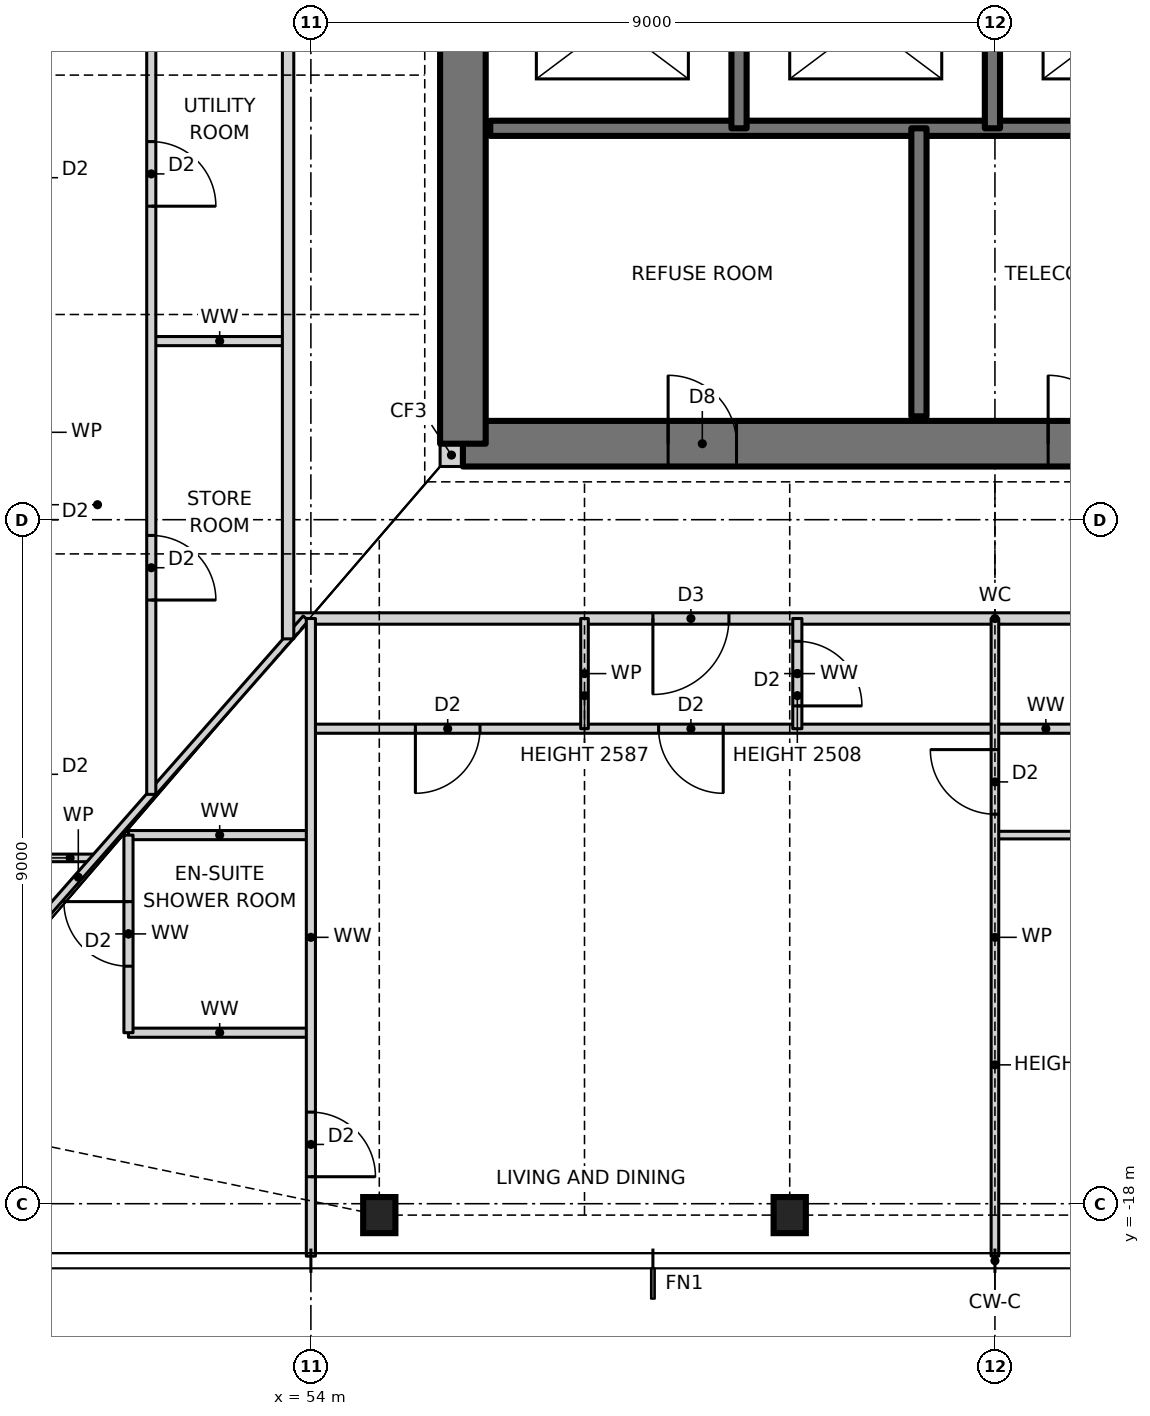
"""IFC4 building model, lengths in metres.
Left out: names, types, materials, properties, quantities, classifications, styles, units other than length and angle.
Written with IfcOpenShell. Run it as: python <this file> out.ifc"""

import sys

from ifc_helpers import new_model, si_unit, direction, frame, frame_2d, origin, origin_2d, place, context, subcontext, project, spatial, rectangle, i_section, extrude, element, fill, save


model = new_model("IFC4")
c1 = context("Model", 3, precision=1e-05, world=origin(), true_north=direction((0.0, 1.0)))
c2 = subcontext(c1, "Body", "Model", "MODEL_VIEW")
j1 = project(units=[si_unit("LENGTHUNIT", "METRE"), si_unit("PLANEANGLEUNIT", "RADIAN")], contexts=[c1])
p1 = place(None, origin())
s1 = spatial("IfcSite", under=j1, at=p1, CompositionType="ELEMENT")
p2 = place(p1, origin())
s2 = spatial("IfcBuilding", under=s1, at=p2, CompositionType="ELEMENT")
p3 = place(p2, frame((0.0, 0.0, 32.5)))
s3 = spatial("IfcBuildingStorey", under=s2, at=p3, CompositionType="ELEMENT", Elevation=32.5)
for number, where, z_axis, x_axis in (
    (1, (54.9, -18.15, 0.0), (0.0, 0.0, 1.0), (1.0, 0.0, 0.0)),
    (2, (60.3, -18.15, 0.0), (0.0, 0.0, 1.0), (1.0, 0.0, 0.0)),
):
    element("IfcColumn", number, at=place(p3, frame(where, z_axis=z_axis, x_axis=x_axis)), inside=s3, PredefinedType="COLUMN", context=c2, shape_type="SweptSolid", body=[
        extrude(i_section(OverallWidth=0.424, OverallDepth=0.475, WebThickness=0.048, FlangeThickness=0.077, at=origin_2d()), origin(), (0.0, 0.0, 1.0), 3.5),
    ])
p4 = place(p3, frame((55.7, -8.15, 0.0), z_axis=(0.0, 0.0, 1.0), x_axis=(1.0, 0.0, 0.0)))
e3 = element("IfcWall", 3, at=p4, inside=s3, PredefinedType="SOLIDWALL", context=c2, shape_type="SweptSolid", body=[
    extrude(rectangle(XDim=0.3, YDim=0.3, at=frame_2d((0.15, 0.0))), origin(), (0.0, 0.0, 1.0), 3.5),
])
p5 = place(p3, frame((56.0, -8.0, 0.0), z_axis=(0.0, 0.0, 1.0), x_axis=(1.0, 0.0, 0.0)))
e4 = element("IfcWall", 4, at=p5, inside=s3, PredefinedType="SHEAR", context=c2, shape_type="SweptSolid", body=[
    extrude(rectangle(XDim=14.0, YDim=0.6, at=frame_2d((7.0, 0.0))), origin(), (0.0, 0.0, 1.0), 3.5),
])
p6 = place(p5, frame((2.7, 0.0, 0.0)))
e5 = element("IfcOpeningElement", 5, at=p6, cuts=e4, PredefinedType="OPENING", context=c2, shape_type="SweptSolid", body=[
    extrude(rectangle(XDim=0.9, YDim=2.1, at=frame_2d((0.45, 1.05))), frame((0.0, 0.31, 0.0), z_axis=(0.0, -1.0, 0.0), x_axis=(1.0, 0.0, 0.0)), (0.0, 0.0, 1.0), 0.62),
])
p7 = place(p5, frame((7.7, 0.0, 0.0)))
e6 = element("IfcOpeningElement", 6, at=p7, cuts=e4, PredefinedType="OPENING", context=c2, shape_type="SweptSolid", body=[
    extrude(rectangle(XDim=0.9, YDim=2.1, at=frame_2d((0.45, 1.05))), frame((0.0, 0.31, 0.0), z_axis=(0.0, -1.0, 0.0), x_axis=(1.0, 0.0, 0.0)), (0.0, 0.0, 1.0), 0.62),
])
p8 = place(p3, frame((56.0, 8.0, 0.0), z_axis=(0.0, 0.0, 1.0), x_axis=(0.0, -1.0, 0.0)))
e7 = element("IfcWall", 7, at=p8, inside=s3, PredefinedType="SHEAR", context=c2, shape_type="SweptSolid", body=[
    extrude(rectangle(XDim=16.0, YDim=0.6, at=frame_2d((8.0, 0.0))), origin(), (0.0, 0.0, 1.0), 3.5),
])
p9 = place(p8, frame((7.5, 0.0, 0.0)))
e8 = element("IfcOpeningElement", 8, at=p9, cuts=e7, PredefinedType="OPENING", context=c2, shape_type="SweptSolid", body=[
    extrude(rectangle(XDim=1.0, YDim=2.1, at=frame_2d((0.5, 1.05))), frame((0.0, 0.31, 0.0), z_axis=(0.0, -1.0, 0.0), x_axis=(1.0, 0.0, 0.0)), (0.0, 0.0, 1.0), 0.62),
])
p10 = place(p3, frame((51.6, -15.75, 0.0), z_axis=(0.0, 0.0, 1.0), x_axis=(1.0, 0.0, 0.0)))
e9 = element("IfcWall", 9, at=p10, inside=s3, PredefinedType="PARTITIONING", context=c2, shape_type="SweptSolid", body=[
    extrude(rectangle(XDim=2.4, YDim=0.12, at=frame_2d((1.2, 0.0))), origin(), (0.0, 0.0, 1.0), 3.27),
])
p11 = place(p3, frame((50.5, -13.45, 0.0), z_axis=(0.0, 0.0, 1.0), x_axis=(1.0, 0.0, 0.0)))
e10 = element("IfcWall", 10, at=p11, inside=s3, PredefinedType="PARTITIONING", context=c2, shape_type="SweptSolid", body=[
    extrude(rectangle(XDim=0.664, YDim=0.1, at=frame_2d((0.332, 0.0))), origin(), (0.0, 0.0, 1.0), 3.27),
])
p12 = place(p3, frame((51.6, -13.15, 0.0), z_axis=(0.0, 0.0, 1.0), x_axis=(1.0, 0.0, 0.0)))
e11 = element("IfcWall", 11, at=p12, inside=s3, PredefinedType="PARTITIONING", context=c2, shape_type="SweptSolid", body=[
    extrude(rectangle(XDim=2.4, YDim=0.12, at=frame_2d((1.2, 0.0))), origin(), (0.0, 0.0, 1.0), 3.27),
])
p13 = place(p3, frame((63.0, -13.15, 0.0), z_axis=(0.0, 0.0, 1.0), x_axis=(1.0, 0.0, 0.0)))
e12 = element("IfcWall", 12, at=p13, inside=s3, PredefinedType="PARTITIONING", context=c2, shape_type="SweptSolid", body=[
    extrude(rectangle(XDim=11.2, YDim=0.1, at=frame_2d((5.6, 0.0))), origin(), (0.0, 0.0, 1.0), 3.27),
])
p14 = place(p13, frame((1.825, 0.0, 0.0)))
e13 = element("IfcOpeningElement", 13, at=p14, cuts=e12, PredefinedType="OPENING", context=c2, shape_type="SweptSolid", body=[
    extrude(rectangle(XDim=0.85, YDim=2.1, at=frame_2d((0.425, 1.05))), frame((0.0, 0.06, 0.0), z_axis=(0.0, -1.0, 0.0), x_axis=(1.0, 0.0, 0.0)), (0.0, 0.0, 1.0), 0.12),
])
p15 = place(p13, frame((6.325, 0.0, 0.0)))
e14 = element("IfcOpeningElement", 14, at=p15, cuts=e12, PredefinedType="OPENING", context=c2, shape_type="SweptSolid", body=[
    extrude(rectangle(XDim=0.85, YDim=2.1, at=frame_2d((0.425, 1.05))), frame((0.0, 0.06, 0.0), z_axis=(0.0, -1.0, 0.0), x_axis=(1.0, 0.0, 0.0)), (0.0, 0.0, 1.0), 0.12),
])
p16 = place(p13, frame((9.675, 0.0, 0.0)))
e15 = element("IfcOpeningElement", 15, at=p16, cuts=e12, PredefinedType="OPENING", context=c2, shape_type="SweptSolid", body=[
    extrude(rectangle(XDim=0.85, YDim=2.1, at=frame_2d((0.425, 1.05))), frame((0.0, 0.06, 0.0), z_axis=(0.0, -1.0, 0.0), x_axis=(1.0, 0.0, 0.0)), (0.0, 0.0, 1.0), 0.12),
])
p17 = place(p3, frame((54.0, -11.75, 0.0), z_axis=(0.0, 0.0, 1.0), x_axis=(1.0, 0.0, 0.0)))
e16 = element("IfcWall", 16, at=p17, inside=s3, PredefinedType="PARTITIONING", context=c2, shape_type="SweptSolid", body=[
    extrude(rectangle(XDim=19.34, YDim=0.12, at=frame_2d((9.67, 0.0))), origin(), (0.0, 0.0, 1.0), 3.27),
])
p18 = place(p17, frame((1.375, 0.0, 0.0)))
e17 = element("IfcOpeningElement", 17, at=p18, cuts=e16, PredefinedType="OPENING", context=c2, shape_type="SweptSolid", body=[
    extrude(rectangle(XDim=0.85, YDim=2.1, at=frame_2d((0.425, 1.05))), frame((0.0, 0.07, 0.0), z_axis=(0.0, -1.0, 0.0), x_axis=(1.0, 0.0, 0.0)), (0.0, 0.0, 1.0), 0.14),
])
p19 = place(p17, frame((4.575, 0.0, 0.0)))
e18 = element("IfcOpeningElement", 18, at=p19, cuts=e16, PredefinedType="OPENING", context=c2, shape_type="SweptSolid", body=[
    extrude(rectangle(XDim=0.85, YDim=2.1, at=frame_2d((0.425, 1.05))), frame((0.0, 0.07, 0.0), z_axis=(0.0, -1.0, 0.0), x_axis=(1.0, 0.0, 0.0)), (0.0, 0.0, 1.0), 0.14),
])
p20 = place(p17, frame((11.325, 0.0, 0.0)))
e19 = element("IfcOpeningElement", 19, at=p20, cuts=e16, PredefinedType="OPENING", context=c2, shape_type="SweptSolid", body=[
    extrude(rectangle(XDim=0.85, YDim=2.1, at=frame_2d((0.425, 1.05))), frame((0.0, 0.07, 0.0), z_axis=(0.0, -1.0, 0.0), x_axis=(1.0, 0.0, 0.0)), (0.0, 0.0, 1.0), 0.14),
])
p21 = place(p17, frame((16.495, 0.0, 0.0)))
e20 = element("IfcOpeningElement", 20, at=p21, cuts=e16, PredefinedType="OPENING", context=c2, shape_type="SweptSolid", body=[
    extrude(rectangle(XDim=0.85, YDim=2.1, at=frame_2d((0.425, 1.05))), frame((0.0, 0.07, 0.0), z_axis=(0.0, -1.0, 0.0), x_axis=(1.0, 0.0, 0.0)), (0.0, 0.0, 1.0), 0.14),
])
p22 = place(p3, frame((53.7, -10.3, 0.0), z_axis=(0.0, 0.0, 1.0), x_axis=(1.0, 0.0, 0.0)))
e21 = element("IfcWall", 21, at=p22, inside=s3, PredefinedType="PARTITIONING", context=c2, shape_type="SweptSolid", body=[
    extrude(rectangle(XDim=18.6, YDim=0.15, at=frame_2d((9.3, 0.0))), origin(), (0.0, 0.0, 1.0), 3.27),
])
p23 = place(p22, frame((4.8, 0.0, 0.0)))
e22 = element("IfcOpeningElement", 22, at=p23, cuts=e21, PredefinedType="OPENING", context=c2, shape_type="SweptSolid", body=[
    extrude(rectangle(XDim=1.0, YDim=2.1, at=frame_2d((0.5, 1.05))), frame((0.0, 0.085, 0.0), z_axis=(0.0, -1.0, 0.0), x_axis=(1.0, 0.0, 0.0)), (0.0, 0.0, 1.0), 0.17),
])
p24 = place(p3, frame((51.9, -6.65, 0.0), z_axis=(0.0, 0.0, 1.0), x_axis=(1.0, 0.0, 0.0)))
e23 = element("IfcWall", 23, at=p24, inside=s3, PredefinedType="PARTITIONING", context=c2, shape_type="SweptSolid", body=[
    extrude(rectangle(XDim=1.8, YDim=0.12, at=frame_2d((0.9, 0.0))), origin(), (0.0, 0.0, 1.0), 3.27),
])
p25 = place(p3, frame((56.36, -3.85, 0.0), z_axis=(0.0, 0.0, 1.0), x_axis=(1.0, 0.0, 0.0)))
e24 = element("IfcWall", 24, at=p25, inside=s3, PredefinedType="SOLIDWALL", context=c2, shape_type="SweptSolid", body=[
    extrude(rectangle(XDim=9.94, YDim=0.2, at=frame_2d((4.97, 0.0))), origin(), (0.0, 0.0, 1.0), 3.5),
])
p26 = place(p3, frame((47.944, -17.109, 0.0), z_axis=(0.0, 0.0, 1.0), x_axis=(0.660638210404, 0.750704439146, 0.0)))
e25 = element("IfcWall", 25, at=p26, inside=s3, PredefinedType="PARTITIONING", context=c2, shape_type="SweptSolid", body=[
    extrude(rectangle(XDim=9.07, YDim=0.1, at=frame_2d((4.535, 0.0))), origin(), (0.0, 0.0, 1.0), 2.429),
])
p27 = place(p3, frame((63.0, -18.69, 0.0), z_axis=(0.0, 0.0, 1.0), x_axis=(0.0, 1.0, 0.0)))
e26 = element("IfcWall", 26, at=p27, inside=s3, PredefinedType="PARTITIONING", context=c2, shape_type="SweptSolid", body=[
    extrude(rectangle(XDim=8.39, YDim=0.1, at=frame_2d((4.195, 0.0))), origin(), (0.0, 0.0, 1.0), 2.587),
])
p28 = place(p27, frame((5.815, 0.0, 0.0)))
e27 = element("IfcOpeningElement", 27, at=p28, cuts=e26, PredefinedType="OPENING", context=c2, shape_type="SweptSolid", body=[
    extrude(rectangle(XDim=0.85, YDim=2.1, at=frame_2d((0.425, 1.05))), frame((0.0, 0.06, 0.0), z_axis=(0.0, -1.0, 0.0), x_axis=(1.0, 0.0, 0.0)), (0.0, 0.0, 1.0), 0.12),
])
p29 = place(p3, frame((62.967, -3.85, 0.0), z_axis=(0.0, 0.0, 1.0), x_axis=(0.0, 1.0, 0.0)))
e28 = element("IfcWall", 28, at=p29, inside=s3, PredefinedType="SOLIDWALL", context=c2, shape_type="SweptSolid", body=[
    extrude(rectangle(XDim=2.8, YDim=0.2, at=frame_2d((1.4, 0.0))), origin(), (0.0, 0.0, 1.0), 3.5),
])
p30 = place(p3, frame((62.0, -7.64, 0.0), z_axis=(0.0, 0.0, 1.0), x_axis=(0.0, 1.0, 0.0)))
e29 = element("IfcWall", 29, at=p30, inside=s3, PredefinedType="SOLIDWALL", context=c2, shape_type="SweptSolid", body=[
    extrude(rectangle(XDim=3.79, YDim=0.2, at=frame_2d((1.895, 0.0))), origin(), (0.0, 0.0, 1.0), 3.5),
])
p31 = place(p3, frame((60.4, -11.75, 0.0), z_axis=(0.0, 0.0, 1.0), x_axis=(0.0, 1.0, 0.0)))
e30 = element("IfcWall", 30, at=p31, inside=s3, PredefinedType="PARTITIONING", context=c2, shape_type="SweptSolid", body=[
    extrude(rectangle(XDim=1.45, YDim=0.12, at=frame_2d((0.725, 0.0))), origin(), (0.0, 0.0, 1.0), 2.508),
])
p32 = place(p31, frame((0.3, 0.0, 0.0)))
e31 = element("IfcOpeningElement", 31, at=p32, cuts=e30, PredefinedType="OPENING", context=c2, shape_type="SweptSolid", body=[
    extrude(rectangle(XDim=0.85, YDim=2.1, at=frame_2d((0.425, 1.05))), frame((0.0, 0.07, 0.0), z_axis=(0.0, -1.0, 0.0), x_axis=(1.0, 0.0, 0.0)), (0.0, 0.0, 1.0), 0.14),
])
p33 = place(p3, frame((59.633, -3.85, 0.0), z_axis=(0.0, 0.0, 1.0), x_axis=(0.0, 1.0, 0.0)))
e32 = element("IfcWall", 32, at=p33, inside=s3, PredefinedType="SOLIDWALL", context=c2, shape_type="SweptSolid", body=[
    extrude(rectangle(XDim=2.8, YDim=0.2, at=frame_2d((1.4, 0.0))), origin(), (0.0, 0.0, 1.0), 3.5),
])
p34 = place(p3, frame((57.6, -11.75, 0.0), z_axis=(0.0, 0.0, 1.0), x_axis=(0.0, 1.0, 0.0)))
e33 = element("IfcWall", 33, at=p34, inside=s3, PredefinedType="PARTITIONING", context=c2, shape_type="SweptSolid", body=[
    extrude(rectangle(XDim=1.45, YDim=0.1, at=frame_2d((0.725, 0.0))), origin(), (0.0, 0.0, 1.0), 2.587),
])
p35 = place(p3, frame((54.0, -18.69, 0.0), z_axis=(0.0, 0.0, 1.0), x_axis=(0.0, 1.0, 0.0)))
e34 = element("IfcWall", 34, at=p35, inside=s3, PredefinedType="PARTITIONING", context=c2, shape_type="SweptSolid", body=[
    extrude(rectangle(XDim=8.39, YDim=0.12, at=frame_2d((4.195, 0.0))), origin(), (0.0, 0.0, 1.0), 3.27),
])
p36 = place(p35, frame((1.045, 0.0, 0.0)))
e35 = element("IfcOpeningElement", 35, at=p36, cuts=e34, PredefinedType="OPENING", context=c2, shape_type="SweptSolid", body=[
    extrude(rectangle(XDim=0.85, YDim=2.1, at=frame_2d((0.425, 1.05))), frame((0.0, 0.07, 0.0), z_axis=(0.0, -1.0, 0.0), x_axis=(1.0, 0.0, 0.0)), (0.0, 0.0, 1.0), 0.14),
])
p37 = place(p3, frame((53.7, -10.568, 0.0), z_axis=(0.0, 0.0, 1.0), x_axis=(0.0, 1.0, 0.0)))
e36 = element("IfcWall", 36, at=p37, inside=s3, PredefinedType="PARTITIONING", context=c2, shape_type="SweptSolid", body=[
    extrude(rectangle(XDim=21.136, YDim=0.15, at=frame_2d((10.568, 0.0))), origin(), (0.0, 0.0, 1.0), 3.27),
])
p38 = place(p37, frame((11.818, 0.0, 0.0)))
e37 = element("IfcOpeningElement", 37, at=p38, cuts=e36, PredefinedType="OPENING", context=c2, shape_type="SweptSolid", body=[
    extrude(rectangle(XDim=1.0, YDim=2.1, at=frame_2d((0.5, 1.05))), frame((0.0, 0.085, 0.0), z_axis=(0.0, -1.0, 0.0), x_axis=(1.0, 0.0, 0.0)), (0.0, 0.0, 1.0), 0.17),
])
p39 = place(p3, frame((51.9, -12.614, 0.0), z_axis=(0.0, 0.0, 1.0), x_axis=(0.0, 1.0, 0.0)))
e38 = element("IfcWall", 38, at=p39, inside=s3, PredefinedType="PARTITIONING", context=c2, shape_type="SweptSolid", body=[
    extrude(rectangle(XDim=25.228, YDim=0.12, at=frame_2d((12.614, 0.0))), origin(), (0.0, 0.0, 1.0), 3.27),
])
p40 = place(p39, frame((17.139, 0.0, 0.0)))
e39 = element("IfcOpeningElement", 39, at=p40, cuts=e38, PredefinedType="OPENING", context=c2, shape_type="SweptSolid", body=[
    extrude(rectangle(XDim=0.85, YDim=2.1, at=frame_2d((0.425, 1.05))), frame((0.0, 0.07, 0.0), z_axis=(0.0, -1.0, 0.0), x_axis=(1.0, 0.0, 0.0)), (0.0, 0.0, 1.0), 0.14),
])
p41 = place(p39, frame((13.939, 0.0, 0.0)))
e40 = element("IfcOpeningElement", 40, at=p41, cuts=e38, PredefinedType="OPENING", context=c2, shape_type="SweptSolid", body=[
    extrude(rectangle(XDim=0.85, YDim=2.1, at=frame_2d((0.425, 1.05))), frame((0.0, 0.07, 0.0), z_axis=(0.0, -1.0, 0.0), x_axis=(1.0, 0.0, 0.0)), (0.0, 0.0, 1.0), 0.14),
])
p42 = place(p39, frame((21.871, 0.0, 0.0)))
e41 = element("IfcOpeningElement", 41, at=p42, cuts=e38, PredefinedType="OPENING", context=c2, shape_type="SweptSolid", body=[
    extrude(rectangle(XDim=0.85, YDim=2.1, at=frame_2d((0.425, 1.05))), frame((0.0, 0.07, 0.0), z_axis=(0.0, -1.0, 0.0), x_axis=(1.0, 0.0, 0.0)), (0.0, 0.0, 1.0), 0.14),
])
p43 = place(p39, frame((7.739, 0.0, 0.0)))
e42 = element("IfcOpeningElement", 42, at=p43, cuts=e38, PredefinedType="OPENING", context=c2, shape_type="SweptSolid", body=[
    extrude(rectangle(XDim=0.85, YDim=2.1, at=frame_2d((0.425, 1.05))), frame((0.0, 0.07, 0.0), z_axis=(0.0, -1.0, 0.0), x_axis=(1.0, 0.0, 0.0)), (0.0, 0.0, 1.0), 0.14),
])
p44 = place(p39, frame((2.557, 0.0, 0.0)))
e43 = element("IfcOpeningElement", 43, at=p44, cuts=e38, PredefinedType="OPENING", context=c2, shape_type="SweptSolid", body=[
    extrude(rectangle(XDim=0.85, YDim=2.1, at=frame_2d((0.425, 1.05))), frame((0.0, 0.07, 0.0), z_axis=(0.0, -1.0, 0.0), x_axis=(1.0, 0.0, 0.0)), (0.0, 0.0, 1.0), 0.14),
])
p45 = place(p3, frame((51.6, -15.75, 0.0), z_axis=(0.0, 0.0, 1.0), x_axis=(0.0, 1.0, 0.0)))
e44 = element("IfcWall", 44, at=p45, inside=s3, PredefinedType="PARTITIONING", context=c2, shape_type="SweptSolid", body=[
    extrude(rectangle(XDim=2.6, YDim=0.12, at=frame_2d((1.3, 0.0))), origin(), (0.0, 0.0, 1.0), 3.27),
])
p46 = place(p45, frame((0.875, 0.0, 0.0)))
e45 = element("IfcOpeningElement", 45, at=p46, cuts=e44, PredefinedType="OPENING", context=c2, shape_type="SweptSolid", body=[
    extrude(rectangle(XDim=0.85, YDim=2.1, at=frame_2d((0.425, 1.05))), frame((0.0, 0.07, 0.0), z_axis=(0.0, -1.0, 0.0), x_axis=(1.0, 0.0, 0.0)), (0.0, 0.0, 1.0), 0.14),
])
p47 = place(p18, frame((0.85, 0.0, 0.0), z_axis=(0.0, 0.0, 1.0), x_axis=(-1.0, 0.0, 0.0)))
e46 = element("IfcDoor", 46, at=p47, inside=s3, OperationType="SINGLE_SWING_RIGHT", PredefinedType="DOOR", context=c2, shape_type="SweptSolid", body=[
    extrude(rectangle(XDim=0.85, YDim=2.1, at=frame_2d((0.425, 1.05))), frame((0.0, 0.025, 0.0), z_axis=(0.0, -1.0, 0.0), x_axis=(1.0, 0.0, 0.0)), (0.0, 0.0, 1.0), 0.05),
])
fill(e17, e46)
p48 = place(p23, frame((1.0, 0.0, 0.0), z_axis=(0.0, 0.0, 1.0), x_axis=(-1.0, 0.0, 0.0)))
e47 = element("IfcDoor", 47, at=p48, inside=s3, OperationType="SINGLE_SWING_RIGHT", PredefinedType="DOOR", context=c2, shape_type="SweptSolid", body=[
    extrude(rectangle(XDim=1.0, YDim=2.1, at=frame_2d((0.5, 1.05))), frame((0.0, 0.025, 0.0), z_axis=(0.0, -1.0, 0.0), x_axis=(1.0, 0.0, 0.0)), (0.0, 0.0, 1.0), 0.05),
])
fill(e22, e47)
p49 = place(p19, frame((0.85, 0.0, 0.0), z_axis=(0.0, 0.0, 1.0), x_axis=(-1.0, 0.0, 0.0)))
e48 = element("IfcDoor", 48, at=p49, inside=s3, OperationType="SINGLE_SWING_LEFT", PredefinedType="DOOR", context=c2, shape_type="SweptSolid", body=[
    extrude(rectangle(XDim=0.85, YDim=2.1, at=frame_2d((0.425, 1.05))), frame((0.0, 0.025, 0.0), z_axis=(0.0, -1.0, 0.0), x_axis=(1.0, 0.0, 0.0)), (0.0, 0.0, 1.0), 0.05),
])
fill(e18, e48)
p50 = place(p32, frame((0.85, 0.0, 0.0), z_axis=(0.0, 0.0, 1.0), x_axis=(-1.0, 0.0, 0.0)))
e49 = element("IfcDoor", 49, at=p50, inside=s3, OperationType="SINGLE_SWING_RIGHT", PredefinedType="DOOR", context=c2, shape_type="SweptSolid", body=[
    extrude(rectangle(XDim=0.85, YDim=2.1, at=frame_2d((0.425, 1.05))), frame((0.0, 0.025, 0.0), z_axis=(0.0, -1.0, 0.0), x_axis=(1.0, 0.0, 0.0)), (0.0, 0.0, 1.0), 0.05),
])
fill(e31, e49)
p51 = place(p46, origin())
e50 = element("IfcDoor", 50, at=p51, inside=s3, OperationType="SINGLE_SWING_RIGHT", PredefinedType="DOOR", context=c2, shape_type="SweptSolid", body=[
    extrude(rectangle(XDim=0.85, YDim=2.1, at=frame_2d((0.425, 1.05))), frame((0.0, 0.025, 0.0), z_axis=(0.0, -1.0, 0.0), x_axis=(1.0, 0.0, 0.0)), (0.0, 0.0, 1.0), 0.05),
])
fill(e45, e50)
p52 = place(p36, frame((0.85, 0.0, 0.0), z_axis=(0.0, 0.0, 1.0), x_axis=(-1.0, 0.0, 0.0)))
e51 = element("IfcDoor", 51, at=p52, inside=s3, OperationType="SINGLE_SWING_RIGHT", PredefinedType="DOOR", context=c2, shape_type="SweptSolid", body=[
    extrude(rectangle(XDim=0.85, YDim=2.1, at=frame_2d((0.425, 1.05))), frame((0.0, 0.025, 0.0), z_axis=(0.0, -1.0, 0.0), x_axis=(1.0, 0.0, 0.0)), (0.0, 0.0, 1.0), 0.05),
])
fill(e35, e51)
p53 = place(p28, origin())
e52 = element("IfcDoor", 52, at=p53, inside=s3, OperationType="SINGLE_SWING_RIGHT", PredefinedType="DOOR", context=c2, shape_type="SweptSolid", body=[
    extrude(rectangle(XDim=0.85, YDim=2.1, at=frame_2d((0.425, 1.05))), frame((0.0, 0.025, 0.0), z_axis=(0.0, -1.0, 0.0), x_axis=(1.0, 0.0, 0.0)), (0.0, 0.0, 1.0), 0.05),
])
fill(e27, e52)
p54 = place(p43, frame((0.85, 0.0, 0.0), z_axis=(0.0, 0.0, 1.0), x_axis=(-1.0, 0.0, 0.0)))
e53 = element("IfcDoor", 53, at=p54, inside=s3, OperationType="SINGLE_SWING_RIGHT", PredefinedType="DOOR", context=c2, shape_type="SweptSolid", body=[
    extrude(rectangle(XDim=0.85, YDim=2.1, at=frame_2d((0.425, 1.05))), frame((0.0, 0.025, 0.0), z_axis=(0.0, -1.0, 0.0), x_axis=(1.0, 0.0, 0.0)), (0.0, 0.0, 1.0), 0.05),
])
fill(e42, e53)
p55 = place(p44, frame((0.85, 0.0, 0.0), z_axis=(0.0, 0.0, 1.0), x_axis=(-1.0, 0.0, 0.0)))
e54 = element("IfcDoor", 54, at=p55, inside=s3, OperationType="SINGLE_SWING_RIGHT", PredefinedType="DOOR", context=c2, shape_type="SweptSolid", body=[
    extrude(rectangle(XDim=0.85, YDim=2.1, at=frame_2d((0.425, 1.05))), frame((0.0, 0.025, 0.0), z_axis=(0.0, -1.0, 0.0), x_axis=(1.0, 0.0, 0.0)), (0.0, 0.0, 1.0), 0.05),
])
fill(e43, e54)
p56 = place(p6, origin())
e55 = element("IfcDoor", 55, at=p56, inside=s3, OperationType="SINGLE_SWING_LEFT", PredefinedType="DOOR", context=c2, shape_type="SweptSolid", body=[
    extrude(rectangle(XDim=0.9, YDim=2.1, at=frame_2d((0.45, 1.05))), frame((0.0, 0.025, 0.0), z_axis=(0.0, -1.0, 0.0), x_axis=(1.0, 0.0, 0.0)), (0.0, 0.0, 1.0), 0.05),
])
fill(e5, e55)
p57 = place(p7, origin())
e56 = element("IfcDoor", 56, at=p57, inside=s3, OperationType="SINGLE_SWING_LEFT", PredefinedType="DOOR", context=c2, shape_type="SweptSolid", body=[
    extrude(rectangle(XDim=0.9, YDim=2.1, at=frame_2d((0.45, 1.05))), frame((0.0, 0.025, 0.0), z_axis=(0.0, -1.0, 0.0), x_axis=(1.0, 0.0, 0.0)), (0.0, 0.0, 1.0), 0.05),
])
fill(e6, e56)
save(model, sys.argv[1])
